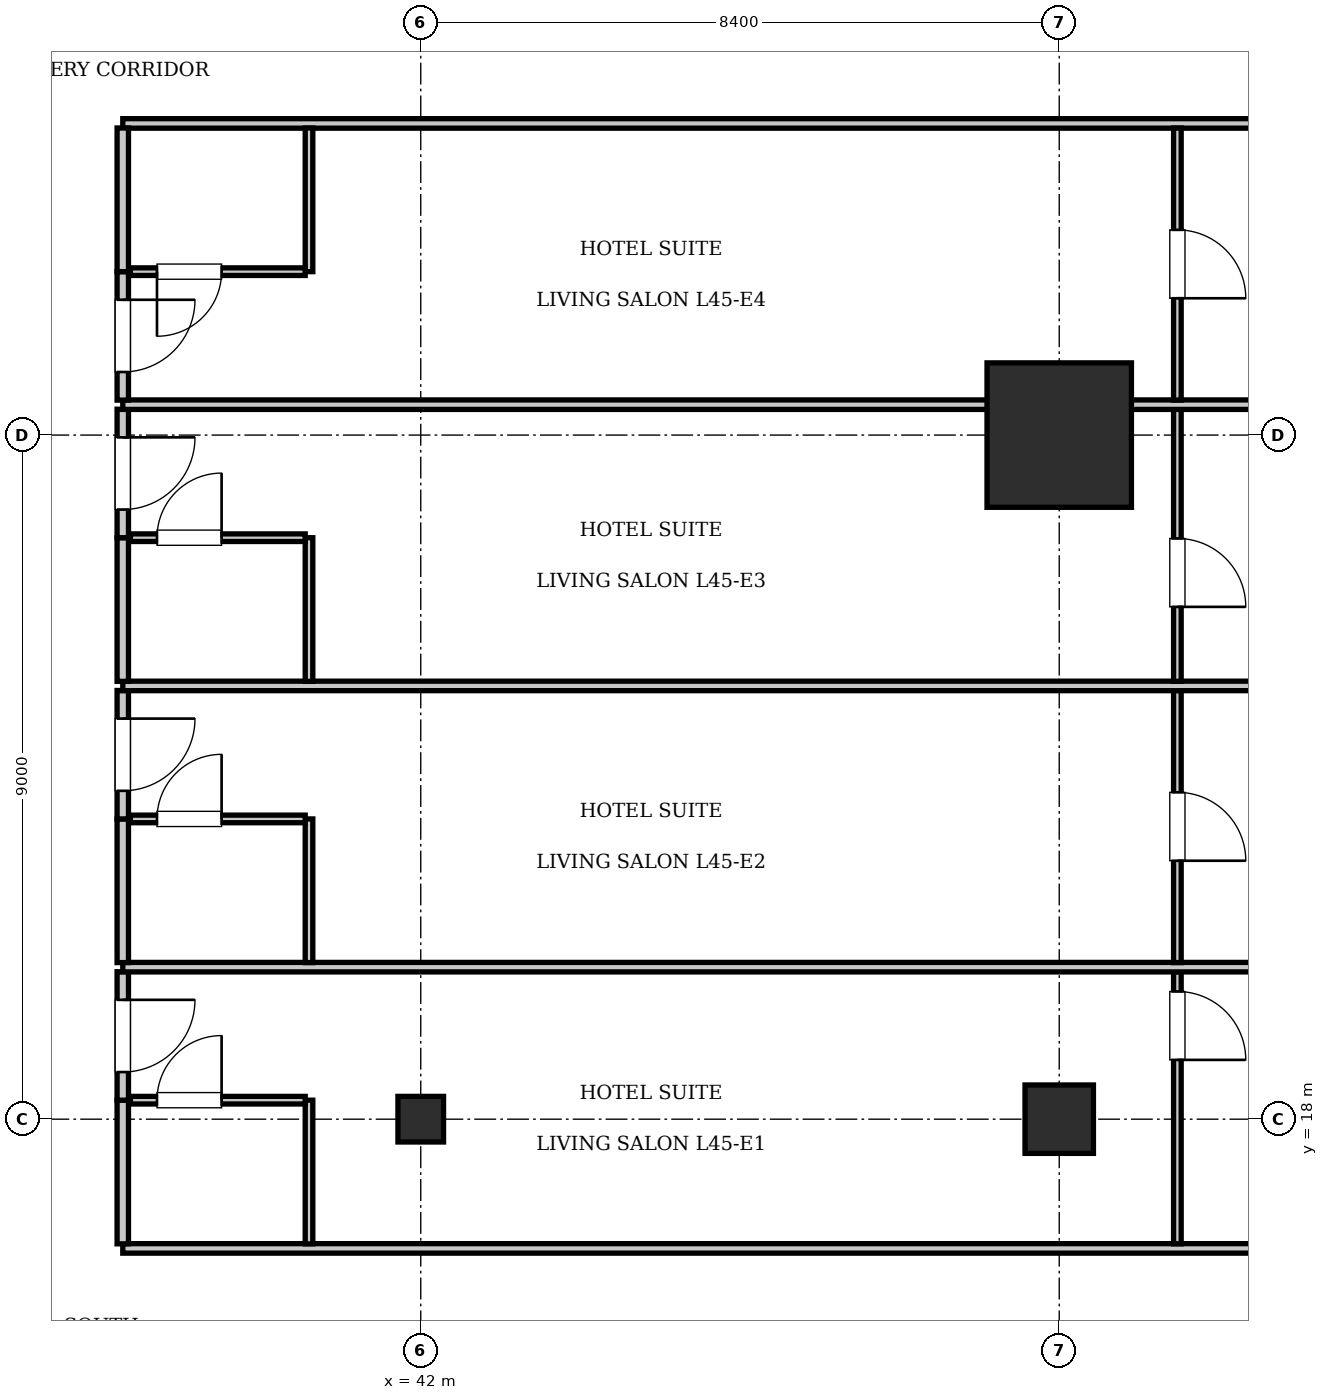
"""IFC4 building model, lengths in metres.
Left out: names, types, materials, properties, quantities, classifications, styles, units other than length and angle.
Written with IfcOpenShell. Run it as: python <this file> out.ifc"""

import sys

from ifc_helpers import new_model, si_unit, direction, frame, frame_2d, origin, origin_2d, place, context, subcontext, project, spatial, rectangle, i_section, extrude, element, fill, save


model = new_model("IFC4")
c1 = context("Model", 3, precision=1e-05, world=origin(), true_north=direction((0.0, 1.0)))
c2 = subcontext(c1, "Body", "Model", "MODEL_VIEW")
j1 = project(units=[si_unit("LENGTHUNIT", "METRE"), si_unit("PLANEANGLEUNIT", "RADIAN")], contexts=[c1])
p1 = place(None, origin())
s1 = spatial("IfcSite", under=j1, at=p1, CompositionType="ELEMENT")
p2 = place(p1, origin())
s2 = spatial("IfcBuilding", under=s1, at=p2, CompositionType="ELEMENT")
p3 = place(p2, frame((0.0, 0.0, 185.15)))
s3 = spatial("IfcBuildingStorey", under=s2, at=p3, CompositionType="ELEMENT", Elevation=185.15)
p4 = place(p3, frame((50.4, 27.0, 0.0), z_axis=(0.0, 0.0, 1.0), x_axis=(1.0, 0.0, 0.0)))
e1 = element("IfcColumn", 1, at=p4, inside=s3, PredefinedType="COLUMN", context=c2, shape_type="SweptSolid", body=[
    extrude(rectangle(XDim=1.9, YDim=1.9, at=origin_2d()), origin(), (0.0, 0.0, 1.0), 3.85),
])
p5 = place(p3, frame((50.4, 18.0, 0.0), z_axis=(0.0, 0.0, 1.0), x_axis=(1.0, 0.0, 0.0)))
e2 = element("IfcColumn", 2, at=p5, inside=s3, PredefinedType="COLUMN", context=c2, shape_type="SweptSolid", body=[
    extrude(rectangle(XDim=0.9, YDim=0.9, at=origin_2d()), origin(), (0.0, 0.0, 1.0), 3.85),
])
p6 = place(p3, frame((42.0, 18.0, 0.0), z_axis=(0.0, 0.0, 1.0), x_axis=(1.0, 0.0, 0.0)))
e3 = element("IfcColumn", 3, at=p6, inside=s3, PredefinedType="COLUMN", context=c2, shape_type="SweptSolid", body=[
    extrude(i_section(OverallWidth=0.6, OverallDepth=0.6, WebThickness=0.025, FlangeThickness=0.038, at=origin_2d()), origin(), (0.0, 0.0, 1.0), 3.85),
])
for number, where, z_axis, x_axis in (
    (4, (38.08, 16.3, 0.0), (0.0, 0.0, 1.0), (1.0, 0.0, 0.0)),
    (5, (38.08, 31.1, 0.0), (0.0, 0.0, 1.0), (1.0, 0.0, 0.0)),
):
    element("IfcWall", number, at=place(p3, frame(where, z_axis=z_axis, x_axis=x_axis)), inside=s3, PredefinedType="PARTITIONING", context=c2, shape_type="SweptSolid", body=[
        extrude(rectangle(XDim=24.32, YDim=0.125, at=frame_2d((12.16, 0.0))), origin(), (0.0, 0.0, 1.0), 3.61),
    ])
p7 = place(p3, frame((38.08, 16.36, 0.0), z_axis=(0.0, 0.0, 1.0), x_axis=(0.0, 1.0, 0.0)))
e6 = element("IfcWall", 6, at=p7, inside=s3, PredefinedType="PARTITIONING", context=c2, shape_type="SweptSolid", body=[
    extrude(rectangle(XDim=1.89, YDim=0.15, at=frame_2d((0.945, 0.0))), origin(), (0.0, 0.0, 1.0), 3.61),
])
p8 = place(p3, frame((38.08, 18.25, 0.0), z_axis=(0.0, 0.0, 1.0), x_axis=(0.0, 1.0, 0.0)))
e7 = element("IfcWall", 7, at=p8, inside=s3, PredefinedType="PARTITIONING", context=c2, shape_type="SweptSolid", body=[
    extrude(rectangle(XDim=1.69, YDim=0.15, at=frame_2d((0.845, 0.0))), origin(), (0.0, 0.0, 1.0), 3.61),
])
p9 = place(p8, frame((0.37, 0.0, 0.0)))
e8 = element("IfcOpeningElement", 8, at=p9, cuts=e7, PredefinedType="OPENING", context=c2, shape_type="SweptSolid", body=[
    extrude(rectangle(XDim=0.95, YDim=2.15, at=frame_2d((0.475, 1.075))), frame((0.0, 0.085, 0.0), z_axis=(0.0, -1.0, 0.0), x_axis=(1.0, 0.0, 0.0)), (0.0, 0.0, 1.0), 0.17),
])
p10 = place(p3, frame((40.53, 16.36, 0.0), z_axis=(0.0, 0.0, 1.0), x_axis=(0.0, 1.0, 0.0)))
e9 = element("IfcWall", 9, at=p10, inside=s3, PredefinedType="PARTITIONING", context=c2, shape_type="SweptSolid", body=[
    extrude(rectangle(XDim=1.89, YDim=0.1, at=frame_2d((0.945, 0.0))), origin(), (0.0, 0.0, 1.0), 3.61),
])
p11 = place(p3, frame((38.18, 18.25, 0.0), z_axis=(0.0, 0.0, 1.0), x_axis=(1.0, 0.0, 0.0)))
e10 = element("IfcWall", 10, at=p11, inside=s3, PredefinedType="PARTITIONING", context=c2, shape_type="SweptSolid", body=[
    extrude(rectangle(XDim=2.3, YDim=0.1, at=frame_2d((1.15, 0.0))), origin(), (0.0, 0.0, 1.0), 3.61),
])
p12 = place(p11, frame((0.35, 0.0, 0.0)))
e11 = element("IfcOpeningElement", 11, at=p12, cuts=e10, PredefinedType="OPENING", context=c2, shape_type="SweptSolid", body=[
    extrude(rectangle(XDim=0.85, YDim=2.1, at=frame_2d((0.425, 1.05))), frame((0.0, 0.06, 0.0), z_axis=(0.0, -1.0, 0.0), x_axis=(1.0, 0.0, 0.0)), (0.0, 0.0, 1.0), 0.12),
])
p13 = place(p3, frame((51.954, 16.36, 0.0), z_axis=(0.0, 0.0, 1.0), x_axis=(0.0, 1.0, 0.0)))
e12 = element("IfcWall", 12, at=p13, inside=s3, PredefinedType="PARTITIONING", context=c2, shape_type="SweptSolid", body=[
    extrude(rectangle(XDim=3.58, YDim=0.1, at=frame_2d((1.79, 0.0))), origin(), (0.0, 0.0, 1.0), 3.61),
])
p14 = place(p13, frame((2.42, 0.0, 0.0)))
e13 = element("IfcOpeningElement", 13, at=p14, cuts=e12, PredefinedType="OPENING", context=c2, shape_type="SweptSolid", body=[
    extrude(rectangle(XDim=0.9, YDim=2.1, at=frame_2d((0.45, 1.05))), frame((0.0, 0.06, 0.0), z_axis=(0.0, -1.0, 0.0), x_axis=(1.0, 0.0, 0.0)), (0.0, 0.0, 1.0), 0.12),
])
p15 = place(p3, frame((38.08, 20.0, 0.0), z_axis=(0.0, 0.0, 1.0), x_axis=(1.0, 0.0, 0.0)))
e14 = element("IfcWall", 14, at=p15, inside=s3, PredefinedType="PARTITIONING", context=c2, shape_type="SweptSolid", body=[
    extrude(rectangle(XDim=24.32, YDim=0.125, at=frame_2d((12.16, 0.0))), origin(), (0.0, 0.0, 1.0), 3.61),
])
p16 = place(p3, frame((38.08, 20.06, 0.0), z_axis=(0.0, 0.0, 1.0), x_axis=(0.0, 1.0, 0.0)))
e15 = element("IfcWall", 15, at=p16, inside=s3, PredefinedType="PARTITIONING", context=c2, shape_type="SweptSolid", body=[
    extrude(rectangle(XDim=1.89, YDim=0.15, at=frame_2d((0.945, 0.0))), origin(), (0.0, 0.0, 1.0), 3.61),
])
p17 = place(p3, frame((38.08, 21.95, 0.0), z_axis=(0.0, 0.0, 1.0), x_axis=(0.0, 1.0, 0.0)))
e16 = element("IfcWall", 16, at=p17, inside=s3, PredefinedType="PARTITIONING", context=c2, shape_type="SweptSolid", body=[
    extrude(rectangle(XDim=1.69, YDim=0.15, at=frame_2d((0.845, 0.0))), origin(), (0.0, 0.0, 1.0), 3.61),
])
p18 = place(p17, frame((0.37, 0.0, 0.0)))
e17 = element("IfcOpeningElement", 17, at=p18, cuts=e16, PredefinedType="OPENING", context=c2, shape_type="SweptSolid", body=[
    extrude(rectangle(XDim=0.95, YDim=2.15, at=frame_2d((0.475, 1.075))), frame((0.0, 0.085, 0.0), z_axis=(0.0, -1.0, 0.0), x_axis=(1.0, 0.0, 0.0)), (0.0, 0.0, 1.0), 0.17),
])
p19 = place(p3, frame((40.53, 20.06, 0.0), z_axis=(0.0, 0.0, 1.0), x_axis=(0.0, 1.0, 0.0)))
e18 = element("IfcWall", 18, at=p19, inside=s3, PredefinedType="PARTITIONING", context=c2, shape_type="SweptSolid", body=[
    extrude(rectangle(XDim=1.89, YDim=0.1, at=frame_2d((0.945, 0.0))), origin(), (0.0, 0.0, 1.0), 3.61),
])
p20 = place(p3, frame((38.18, 21.95, 0.0), z_axis=(0.0, 0.0, 1.0), x_axis=(1.0, 0.0, 0.0)))
e19 = element("IfcWall", 19, at=p20, inside=s3, PredefinedType="PARTITIONING", context=c2, shape_type="SweptSolid", body=[
    extrude(rectangle(XDim=2.3, YDim=0.1, at=frame_2d((1.15, 0.0))), origin(), (0.0, 0.0, 1.0), 3.61),
])
p21 = place(p20, frame((0.35, 0.0, 0.0)))
e20 = element("IfcOpeningElement", 20, at=p21, cuts=e19, PredefinedType="OPENING", context=c2, shape_type="SweptSolid", body=[
    extrude(rectangle(XDim=0.85, YDim=2.1, at=frame_2d((0.425, 1.05))), frame((0.0, 0.06, 0.0), z_axis=(0.0, -1.0, 0.0), x_axis=(1.0, 0.0, 0.0)), (0.0, 0.0, 1.0), 0.12),
])
p22 = place(p3, frame((51.954, 20.06, 0.0), z_axis=(0.0, 0.0, 1.0), x_axis=(0.0, 1.0, 0.0)))
e21 = element("IfcWall", 21, at=p22, inside=s3, PredefinedType="PARTITIONING", context=c2, shape_type="SweptSolid", body=[
    extrude(rectangle(XDim=3.58, YDim=0.1, at=frame_2d((1.79, 0.0))), origin(), (0.0, 0.0, 1.0), 3.61),
])
p23 = place(p22, frame((1.34, 0.0, 0.0)))
e22 = element("IfcOpeningElement", 22, at=p23, cuts=e21, PredefinedType="OPENING", context=c2, shape_type="SweptSolid", body=[
    extrude(rectangle(XDim=0.9, YDim=2.1, at=frame_2d((0.45, 1.05))), frame((0.0, 0.06, 0.0), z_axis=(0.0, -1.0, 0.0), x_axis=(1.0, 0.0, 0.0)), (0.0, 0.0, 1.0), 0.12),
])
p24 = place(p3, frame((38.08, 23.7, 0.0), z_axis=(0.0, 0.0, 1.0), x_axis=(1.0, 0.0, 0.0)))
e23 = element("IfcWall", 23, at=p24, inside=s3, PredefinedType="PARTITIONING", context=c2, shape_type="SweptSolid", body=[
    extrude(rectangle(XDim=24.32, YDim=0.125, at=frame_2d((12.16, 0.0))), origin(), (0.0, 0.0, 1.0), 3.61),
])
p25 = place(p3, frame((38.08, 23.76, 0.0), z_axis=(0.0, 0.0, 1.0), x_axis=(0.0, 1.0, 0.0)))
e24 = element("IfcWall", 24, at=p25, inside=s3, PredefinedType="PARTITIONING", context=c2, shape_type="SweptSolid", body=[
    extrude(rectangle(XDim=1.89, YDim=0.15, at=frame_2d((0.945, 0.0))), origin(), (0.0, 0.0, 1.0), 3.61),
])
p26 = place(p3, frame((38.08, 25.65, 0.0), z_axis=(0.0, 0.0, 1.0), x_axis=(0.0, 1.0, 0.0)))
e25 = element("IfcWall", 25, at=p26, inside=s3, PredefinedType="PARTITIONING", context=c2, shape_type="SweptSolid", body=[
    extrude(rectangle(XDim=1.69, YDim=0.15, at=frame_2d((0.845, 0.0))), origin(), (0.0, 0.0, 1.0), 3.61),
])
p27 = place(p26, frame((0.37, 0.0, 0.0)))
e26 = element("IfcOpeningElement", 26, at=p27, cuts=e25, PredefinedType="OPENING", context=c2, shape_type="SweptSolid", body=[
    extrude(rectangle(XDim=0.95, YDim=2.15, at=frame_2d((0.475, 1.075))), frame((0.0, 0.085, 0.0), z_axis=(0.0, -1.0, 0.0), x_axis=(1.0, 0.0, 0.0)), (0.0, 0.0, 1.0), 0.17),
])
p28 = place(p3, frame((40.53, 23.76, 0.0), z_axis=(0.0, 0.0, 1.0), x_axis=(0.0, 1.0, 0.0)))
e27 = element("IfcWall", 27, at=p28, inside=s3, PredefinedType="PARTITIONING", context=c2, shape_type="SweptSolid", body=[
    extrude(rectangle(XDim=1.89, YDim=0.1, at=frame_2d((0.945, 0.0))), origin(), (0.0, 0.0, 1.0), 3.61),
])
p29 = place(p3, frame((38.18, 25.65, 0.0), z_axis=(0.0, 0.0, 1.0), x_axis=(1.0, 0.0, 0.0)))
e28 = element("IfcWall", 28, at=p29, inside=s3, PredefinedType="PARTITIONING", context=c2, shape_type="SweptSolid", body=[
    extrude(rectangle(XDim=2.3, YDim=0.1, at=frame_2d((1.15, 0.0))), origin(), (0.0, 0.0, 1.0), 3.61),
])
p30 = place(p29, frame((0.35, 0.0, 0.0)))
e29 = element("IfcOpeningElement", 29, at=p30, cuts=e28, PredefinedType="OPENING", context=c2, shape_type="SweptSolid", body=[
    extrude(rectangle(XDim=0.85, YDim=2.1, at=frame_2d((0.425, 1.05))), frame((0.0, 0.06, 0.0), z_axis=(0.0, -1.0, 0.0), x_axis=(1.0, 0.0, 0.0)), (0.0, 0.0, 1.0), 0.12),
])
p31 = place(p3, frame((51.954, 23.76, 0.0), z_axis=(0.0, 0.0, 1.0), x_axis=(0.0, 1.0, 0.0)))
e30 = element("IfcWall", 30, at=p31, inside=s3, PredefinedType="PARTITIONING", context=c2, shape_type="SweptSolid", body=[
    extrude(rectangle(XDim=3.58, YDim=0.1, at=frame_2d((1.79, 0.0))), origin(), (0.0, 0.0, 1.0), 3.61),
])
p32 = place(p31, frame((0.98, 0.0, 0.0)))
e31 = element("IfcOpeningElement", 31, at=p32, cuts=e30, PredefinedType="OPENING", context=c2, shape_type="SweptSolid", body=[
    extrude(rectangle(XDim=0.9, YDim=2.1, at=frame_2d((0.45, 1.05))), frame((0.0, 0.06, 0.0), z_axis=(0.0, -1.0, 0.0), x_axis=(1.0, 0.0, 0.0)), (0.0, 0.0, 1.0), 0.12),
])
p33 = place(p3, frame((38.08, 27.4, 0.0), z_axis=(0.0, 0.0, 1.0), x_axis=(1.0, 0.0, 0.0)))
e32 = element("IfcWall", 32, at=p33, inside=s3, PredefinedType="PARTITIONING", context=c2, shape_type="SweptSolid", body=[
    extrude(rectangle(XDim=24.32, YDim=0.125, at=frame_2d((12.16, 0.0))), origin(), (0.0, 0.0, 1.0), 3.61),
])
p34 = place(p3, frame((38.08, 27.46, 0.0), z_axis=(0.0, 0.0, 1.0), x_axis=(0.0, 1.0, 0.0)))
e33 = element("IfcWall", 33, at=p34, inside=s3, PredefinedType="PARTITIONING", context=c2, shape_type="SweptSolid", body=[
    extrude(rectangle(XDim=1.69, YDim=0.15, at=frame_2d((0.845, 0.0))), origin(), (0.0, 0.0, 1.0), 3.61),
])
p35 = place(p34, frame((0.37, 0.0, 0.0)))
e34 = element("IfcOpeningElement", 34, at=p35, cuts=e33, PredefinedType="OPENING", context=c2, shape_type="SweptSolid", body=[
    extrude(rectangle(XDim=0.95, YDim=2.15, at=frame_2d((0.475, 1.075))), frame((0.0, 0.085, 0.0), z_axis=(0.0, -1.0, 0.0), x_axis=(1.0, 0.0, 0.0)), (0.0, 0.0, 1.0), 0.17),
])
p36 = place(p3, frame((38.08, 29.15, 0.0), z_axis=(0.0, 0.0, 1.0), x_axis=(0.0, 1.0, 0.0)))
e35 = element("IfcWall", 35, at=p36, inside=s3, PredefinedType="PARTITIONING", context=c2, shape_type="SweptSolid", body=[
    extrude(rectangle(XDim=1.89, YDim=0.15, at=frame_2d((0.945, 0.0))), origin(), (0.0, 0.0, 1.0), 3.61),
])
p37 = place(p3, frame((40.53, 29.15, 0.0), z_axis=(0.0, 0.0, 1.0), x_axis=(0.0, 1.0, 0.0)))
e36 = element("IfcWall", 36, at=p37, inside=s3, PredefinedType="PARTITIONING", context=c2, shape_type="SweptSolid", body=[
    extrude(rectangle(XDim=1.89, YDim=0.1, at=frame_2d((0.945, 0.0))), origin(), (0.0, 0.0, 1.0), 3.61),
])
p38 = place(p3, frame((38.18, 29.15, 0.0), z_axis=(0.0, 0.0, 1.0), x_axis=(1.0, 0.0, 0.0)))
e37 = element("IfcWall", 37, at=p38, inside=s3, PredefinedType="PARTITIONING", context=c2, shape_type="SweptSolid", body=[
    extrude(rectangle(XDim=2.3, YDim=0.1, at=frame_2d((1.15, 0.0))), origin(), (0.0, 0.0, 1.0), 3.61),
])
p39 = place(p38, frame((0.35, 0.0, 0.0)))
e38 = element("IfcOpeningElement", 38, at=p39, cuts=e37, PredefinedType="OPENING", context=c2, shape_type="SweptSolid", body=[
    extrude(rectangle(XDim=0.85, YDim=2.1, at=frame_2d((0.425, 1.05))), frame((0.0, 0.06, 0.0), z_axis=(0.0, -1.0, 0.0), x_axis=(1.0, 0.0, 0.0)), (0.0, 0.0, 1.0), 0.12),
])
p40 = place(p3, frame((51.954, 27.46, 0.0), z_axis=(0.0, 0.0, 1.0), x_axis=(0.0, 1.0, 0.0)))
e39 = element("IfcWall", 39, at=p40, inside=s3, PredefinedType="PARTITIONING", context=c2, shape_type="SweptSolid", body=[
    extrude(rectangle(XDim=3.58, YDim=0.1, at=frame_2d((1.79, 0.0))), origin(), (0.0, 0.0, 1.0), 3.61),
])
p41 = place(p40, frame((1.34, 0.0, 0.0)))
e40 = element("IfcOpeningElement", 40, at=p41, cuts=e39, PredefinedType="OPENING", context=c2, shape_type="SweptSolid", body=[
    extrude(rectangle(XDim=0.9, YDim=2.1, at=frame_2d((0.45, 1.05))), frame((0.0, 0.06, 0.0), z_axis=(0.0, -1.0, 0.0), x_axis=(1.0, 0.0, 0.0)), (0.0, 0.0, 1.0), 0.12),
])
p42 = place(p12, origin())
e41 = element("IfcDoor", 41, at=p42, inside=s3, OperationType="SINGLE_SWING_RIGHT", PredefinedType="DOOR", context=c2, shape_type="SweptSolid", body=[
    extrude(rectangle(XDim=0.85, YDim=2.1, at=frame_2d((0.425, 1.05))), frame((0.0, 0.025, 0.0), z_axis=(0.0, -1.0, 0.0), x_axis=(1.0, 0.0, 0.0)), (0.0, 0.0, 1.0), 0.05),
])
fill(e11, e41)
p43 = place(p9, frame((0.95, 0.0, 0.0), z_axis=(0.0, 0.0, 1.0), x_axis=(-1.0, 0.0, 0.0)))
e42 = element("IfcDoor", 42, at=p43, inside=s3, OperationType="SINGLE_SWING_LEFT", PredefinedType="DOOR", context=c2, shape_type="SweptSolid", body=[
    extrude(rectangle(XDim=0.95, YDim=2.15, at=frame_2d((0.475, 1.075))), frame((0.0, 0.025, 0.0), z_axis=(0.0, -1.0, 0.0), x_axis=(1.0, 0.0, 0.0)), (0.0, 0.0, 1.0), 0.05),
])
fill(e8, e42)
p44 = place(p14, frame((0.9, 0.0, 0.0), z_axis=(0.0, 0.0, 1.0), x_axis=(-1.0, 0.0, 0.0)))
e43 = element("IfcDoor", 43, at=p44, inside=s3, OperationType="SINGLE_SWING_RIGHT", PredefinedType="DOOR", context=c2, shape_type="SweptSolid", body=[
    extrude(rectangle(XDim=0.9, YDim=2.1, at=frame_2d((0.45, 1.05))), frame((0.0, 0.025, 0.0), z_axis=(0.0, -1.0, 0.0), x_axis=(1.0, 0.0, 0.0)), (0.0, 0.0, 1.0), 0.05),
])
fill(e13, e43)
p45 = place(p21, origin())
e44 = element("IfcDoor", 44, at=p45, inside=s3, OperationType="SINGLE_SWING_RIGHT", PredefinedType="DOOR", context=c2, shape_type="SweptSolid", body=[
    extrude(rectangle(XDim=0.85, YDim=2.1, at=frame_2d((0.425, 1.05))), frame((0.0, 0.025, 0.0), z_axis=(0.0, -1.0, 0.0), x_axis=(1.0, 0.0, 0.0)), (0.0, 0.0, 1.0), 0.05),
])
fill(e20, e44)
p46 = place(p18, frame((0.95, 0.0, 0.0), z_axis=(0.0, 0.0, 1.0), x_axis=(-1.0, 0.0, 0.0)))
e45 = element("IfcDoor", 45, at=p46, inside=s3, OperationType="SINGLE_SWING_LEFT", PredefinedType="DOOR", context=c2, shape_type="SweptSolid", body=[
    extrude(rectangle(XDim=0.95, YDim=2.15, at=frame_2d((0.475, 1.075))), frame((0.0, 0.025, 0.0), z_axis=(0.0, -1.0, 0.0), x_axis=(1.0, 0.0, 0.0)), (0.0, 0.0, 1.0), 0.05),
])
fill(e17, e45)
p47 = place(p23, frame((0.9, 0.0, 0.0), z_axis=(0.0, 0.0, 1.0), x_axis=(-1.0, 0.0, 0.0)))
e46 = element("IfcDoor", 46, at=p47, inside=s3, OperationType="SINGLE_SWING_RIGHT", PredefinedType="DOOR", context=c2, shape_type="SweptSolid", body=[
    extrude(rectangle(XDim=0.9, YDim=2.1, at=frame_2d((0.45, 1.05))), frame((0.0, 0.025, 0.0), z_axis=(0.0, -1.0, 0.0), x_axis=(1.0, 0.0, 0.0)), (0.0, 0.0, 1.0), 0.05),
])
fill(e22, e46)
p48 = place(p30, origin())
e47 = element("IfcDoor", 47, at=p48, inside=s3, OperationType="SINGLE_SWING_RIGHT", PredefinedType="DOOR", context=c2, shape_type="SweptSolid", body=[
    extrude(rectangle(XDim=0.85, YDim=2.1, at=frame_2d((0.425, 1.05))), frame((0.0, 0.025, 0.0), z_axis=(0.0, -1.0, 0.0), x_axis=(1.0, 0.0, 0.0)), (0.0, 0.0, 1.0), 0.05),
])
fill(e29, e47)
p49 = place(p27, frame((0.95, 0.0, 0.0), z_axis=(0.0, 0.0, 1.0), x_axis=(-1.0, 0.0, 0.0)))
e48 = element("IfcDoor", 48, at=p49, inside=s3, OperationType="SINGLE_SWING_LEFT", PredefinedType="DOOR", context=c2, shape_type="SweptSolid", body=[
    extrude(rectangle(XDim=0.95, YDim=2.15, at=frame_2d((0.475, 1.075))), frame((0.0, 0.025, 0.0), z_axis=(0.0, -1.0, 0.0), x_axis=(1.0, 0.0, 0.0)), (0.0, 0.0, 1.0), 0.05),
])
fill(e26, e48)
p50 = place(p32, frame((0.9, 0.0, 0.0), z_axis=(0.0, 0.0, 1.0), x_axis=(-1.0, 0.0, 0.0)))
e49 = element("IfcDoor", 49, at=p50, inside=s3, OperationType="SINGLE_SWING_RIGHT", PredefinedType="DOOR", context=c2, shape_type="SweptSolid", body=[
    extrude(rectangle(XDim=0.9, YDim=2.1, at=frame_2d((0.45, 1.05))), frame((0.0, 0.025, 0.0), z_axis=(0.0, -1.0, 0.0), x_axis=(1.0, 0.0, 0.0)), (0.0, 0.0, 1.0), 0.05),
])
fill(e31, e49)
p51 = place(p39, frame((0.85, 0.0, 0.0), z_axis=(0.0, 0.0, 1.0), x_axis=(-1.0, 0.0, 0.0)))
e50 = element("IfcDoor", 50, at=p51, inside=s3, OperationType="SINGLE_SWING_RIGHT", PredefinedType="DOOR", context=c2, shape_type="SweptSolid", body=[
    extrude(rectangle(XDim=0.85, YDim=2.1, at=frame_2d((0.425, 1.05))), frame((0.0, 0.025, 0.0), z_axis=(0.0, -1.0, 0.0), x_axis=(1.0, 0.0, 0.0)), (0.0, 0.0, 1.0), 0.05),
])
fill(e38, e50)
p52 = place(p35, frame((0.95, 0.0, 0.0), z_axis=(0.0, 0.0, 1.0), x_axis=(-1.0, 0.0, 0.0)))
e51 = element("IfcDoor", 51, at=p52, inside=s3, OperationType="SINGLE_SWING_LEFT", PredefinedType="DOOR", context=c2, shape_type="SweptSolid", body=[
    extrude(rectangle(XDim=0.95, YDim=2.15, at=frame_2d((0.475, 1.075))), frame((0.0, 0.025, 0.0), z_axis=(0.0, -1.0, 0.0), x_axis=(1.0, 0.0, 0.0)), (0.0, 0.0, 1.0), 0.05),
])
fill(e34, e51)
p53 = place(p41, frame((0.9, 0.0, 0.0), z_axis=(0.0, 0.0, 1.0), x_axis=(-1.0, 0.0, 0.0)))
e52 = element("IfcDoor", 52, at=p53, inside=s3, OperationType="SINGLE_SWING_RIGHT", PredefinedType="DOOR", context=c2, shape_type="SweptSolid", body=[
    extrude(rectangle(XDim=0.9, YDim=2.1, at=frame_2d((0.45, 1.05))), frame((0.0, 0.025, 0.0), z_axis=(0.0, -1.0, 0.0), x_axis=(1.0, 0.0, 0.0)), (0.0, 0.0, 1.0), 0.05),
])
fill(e40, e52)
save(model, sys.argv[1])
